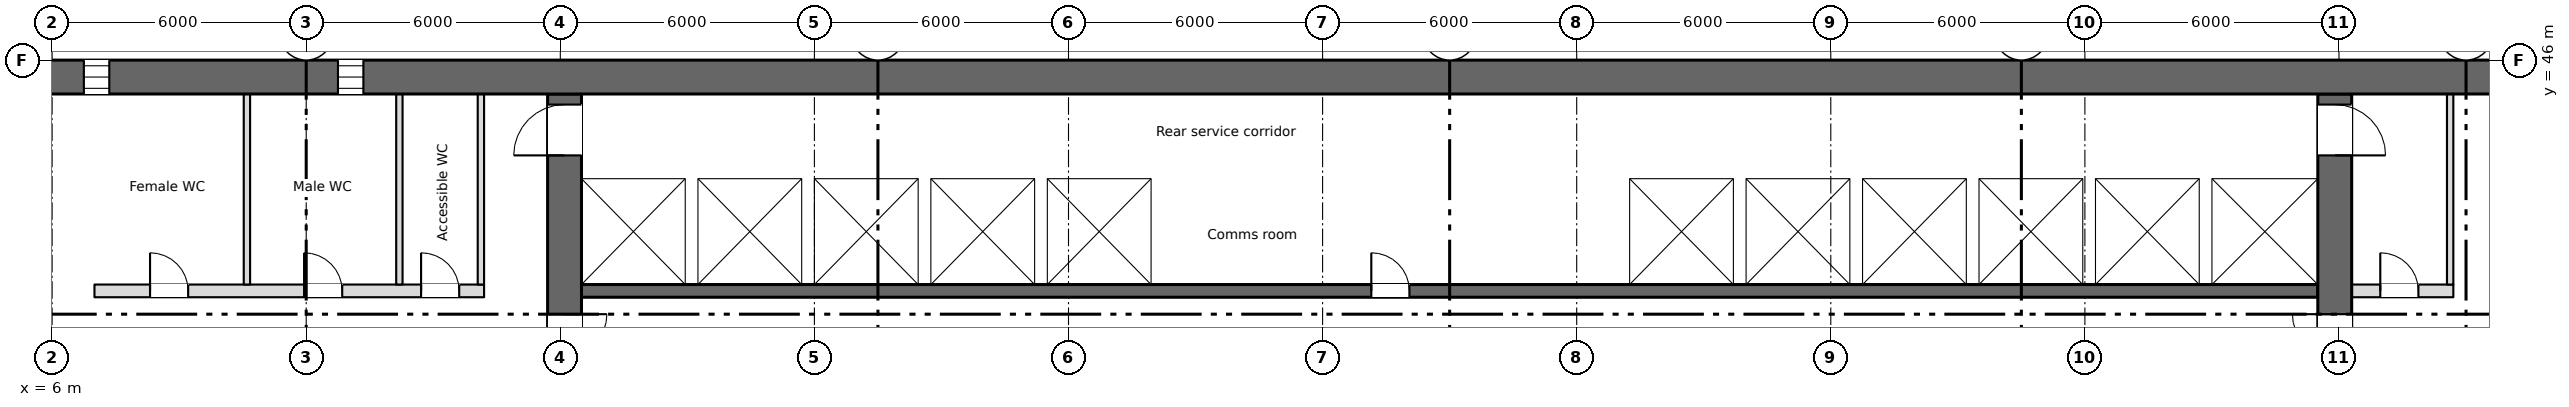
"""IFC4 building model, lengths in metres.
Left out: names, types, materials, properties, quantities, classifications, styles, units other than length and angle.
Written with IfcOpenShell. Run it as: python <this file> out.ifc"""

import sys

from ifc_helpers import new_model, si_unit, direction, frame, frame_2d, origin, place, context, subcontext, project, spatial, rectangle, extrude, element, fill, save


model = new_model("IFC4")
c1 = context("Model", 3, precision=1e-05, world=origin(), true_north=direction((0.0, 1.0)))
c2 = subcontext(c1, "Body", "Model", "MODEL_VIEW")
j1 = project(units=[si_unit("LENGTHUNIT", "METRE"), si_unit("PLANEANGLEUNIT", "RADIAN")], contexts=[c1])
p1 = place(None, origin())
s1 = spatial("IfcSite", under=j1, at=p1, CompositionType="ELEMENT")
p2 = place(p1, origin())
s2 = spatial("IfcBuilding", under=s1, at=p2, CompositionType="ELEMENT")
p3 = place(p2, frame((0.0, 0.0, 102.5)))
s3 = spatial("IfcBuildingStorey", under=s2, at=p3, CompositionType="ELEMENT", Elevation=102.5)
p4 = place(p3, frame((5.55, 45.6, 0.0), z_axis=(0.0, 0.0, 1.0), x_axis=(1.0, 0.0, 0.0)))
e1 = element("IfcWall", 1, at=p4, inside=s3, PredefinedType="SHEAR", context=c2, shape_type="SweptSolid", body=[
    extrude(rectangle(XDim=60.9, YDim=0.8, at=frame_2d((30.45, 0.0))), origin(), (0.0, 0.0, 1.0), 3.35),
])
p5 = place(p4, frame((1.2, 0.0, 0.6)))
e2 = element("IfcOpeningElement", 2, at=p5, cuts=e1, PredefinedType="OPENING", context=c2, shape_type="SweptSolid", body=[
    extrude(rectangle(XDim=0.6, YDim=2.4, at=frame_2d((0.3, 1.2))), frame((0.0, 0.41, 0.0), z_axis=(0.0, -1.0, 0.0), x_axis=(1.0, 0.0, 0.0)), (0.0, 0.0, 1.0), 0.82),
])
p6 = place(p4, frame((7.2, 0.0, 0.6)))
e3 = element("IfcOpeningElement", 3, at=p6, cuts=e1, PredefinedType="OPENING", context=c2, shape_type="SweptSolid", body=[
    extrude(rectangle(XDim=0.6, YDim=2.4, at=frame_2d((0.3, 1.2))), frame((0.0, 0.41, 0.0), z_axis=(0.0, -1.0, 0.0), x_axis=(1.0, 0.0, 0.0)), (0.0, 0.0, 1.0), 0.82),
])
p7 = place(p3, frame((6.85, 28.4, 0.0), z_axis=(0.0, 0.0, 1.0), x_axis=(0.0, 1.0, 0.0)))
e4 = element("IfcWall", 4, at=p7, inside=s3, PredefinedType="SHEAR", context=c2, shape_type="SweptSolid", body=[
    extrude(rectangle(XDim=16.8, YDim=0.3, at=frame_2d((8.4, 0.0))), origin(), (0.0, 0.0, 1.0), 3.35),
])
p8 = place(p3, frame((18.1, 28.4, 0.0), z_axis=(0.0, 0.0, 1.0), x_axis=(0.0, 1.0, 0.0)))
e5 = element("IfcWall", 5, at=p8, inside=s3, PredefinedType="SHEAR", context=c2, shape_type="SweptSolid", body=[
    extrude(rectangle(XDim=16.8, YDim=0.8, at=frame_2d((8.4, 0.0))), origin(), (0.0, 0.0, 1.0), 3.35),
])
p9 = place(p8, frame((9.6, 0.0, 0.0)))
e6 = element("IfcOpeningElement", 6, at=p9, cuts=e5, PredefinedType="OPENING", context=c2, shape_type="SweptSolid", body=[
    extrude(rectangle(XDim=2.0, YDim=2.1, at=frame_2d((1.0, 1.05))), frame((0.0, 0.41, 0.0), z_axis=(0.0, -1.0, 0.0), x_axis=(1.0, 0.0, 0.0)), (0.0, 0.0, 1.0), 0.82),
])
p10 = place(p8, frame((15.35, 0.0, 0.0)))
e7 = element("IfcOpeningElement", 7, at=p10, cuts=e5, PredefinedType="OPENING", context=c2, shape_type="SweptSolid", body=[
    extrude(rectangle(XDim=1.2, YDim=2.1, at=frame_2d((0.6, 1.05))), frame((0.0, 0.41, 0.0), z_axis=(0.0, -1.0, 0.0), x_axis=(1.0, 0.0, 0.0)), (0.0, 0.0, 1.0), 0.82),
])
p11 = place(p3, frame((59.9, 28.4, 0.0), z_axis=(0.0, 0.0, 1.0), x_axis=(0.0, 1.0, 0.0)))
e8 = element("IfcWall", 8, at=p11, inside=s3, PredefinedType="SHEAR", context=c2, shape_type="SweptSolid", body=[
    extrude(rectangle(XDim=16.8, YDim=0.8, at=frame_2d((8.4, 0.0))), origin(), (0.0, 0.0, 1.0), 3.35),
])
p12 = place(p11, frame((9.6, 0.0, 0.0)))
e9 = element("IfcOpeningElement", 9, at=p12, cuts=e8, PredefinedType="OPENING", context=c2, shape_type="SweptSolid", body=[
    extrude(rectangle(XDim=2.0, YDim=2.1, at=frame_2d((1.0, 1.05))), frame((0.0, 0.41, 0.0), z_axis=(0.0, -1.0, 0.0), x_axis=(1.0, 0.0, 0.0)), (0.0, 0.0, 1.0), 0.82),
])
p13 = place(p11, frame((15.35, 0.0, 0.0)))
e10 = element("IfcOpeningElement", 10, at=p13, cuts=e8, PredefinedType="OPENING", context=c2, shape_type="SweptSolid", body=[
    extrude(rectangle(XDim=1.2, YDim=2.1, at=frame_2d((0.6, 1.05))), frame((0.0, 0.41, 0.0), z_axis=(0.0, -1.0, 0.0), x_axis=(1.0, 0.0, 0.0)), (0.0, 0.0, 1.0), 0.82),
])
p14 = place(p3, frame((18.5, 40.55, 0.0), z_axis=(0.0, 0.0, 1.0), x_axis=(1.0, 0.0, 0.0)))
e11 = element("IfcWall", 11, at=p14, inside=s3, PredefinedType="SHEAR", context=c2, shape_type="SweptSolid", body=[
    extrude(rectangle(XDim=41.0, YDim=0.3, at=frame_2d((20.5, 0.0))), origin(), (0.0, 0.0, 1.0), 3.35),
])
p15 = place(p14, frame((18.65, 0.0, 0.0)))
e12 = element("IfcOpeningElement", 12, at=p15, cuts=e11, PredefinedType="OPENING", context=c2, shape_type="SweptSolid", body=[
    extrude(rectangle(XDim=0.9, YDim=2.1, at=frame_2d((0.45, 1.05))), frame((0.0, 0.16, 0.0), z_axis=(0.0, -1.0, 0.0), x_axis=(1.0, 0.0, 0.0)), (0.0, 0.0, 1.0), 0.32),
])
p16 = place(p14, frame((6.175, 0.0, 0.0)))
e13 = element("IfcOpeningElement", 13, at=p16, cuts=e11, PredefinedType="OPENING", context=c2, shape_type="SweptSolid", body=[
    extrude(rectangle(XDim=1.1, YDim=2.1, at=frame_2d((0.55, 1.05))), frame((0.0, 0.16, 0.0), z_axis=(0.0, -1.0, 0.0), x_axis=(1.0, 0.0, 0.0)), (0.0, 0.0, 1.0), 0.32),
])
p17 = place(p14, frame((8.925, 0.0, 0.0)))
e14 = element("IfcOpeningElement", 14, at=p17, cuts=e11, PredefinedType="OPENING", context=c2, shape_type="SweptSolid", body=[
    extrude(rectangle(XDim=1.1, YDim=2.1, at=frame_2d((0.55, 1.05))), frame((0.0, 0.16, 0.0), z_axis=(0.0, -1.0, 0.0), x_axis=(1.0, 0.0, 0.0)), (0.0, 0.0, 1.0), 0.32),
])
p18 = place(p14, frame((11.675, 0.0, 0.0)))
e15 = element("IfcOpeningElement", 15, at=p18, cuts=e11, PredefinedType="OPENING", context=c2, shape_type="SweptSolid", body=[
    extrude(rectangle(XDim=1.1, YDim=2.1, at=frame_2d((0.55, 1.05))), frame((0.0, 0.16, 0.0), z_axis=(0.0, -1.0, 0.0), x_axis=(1.0, 0.0, 0.0)), (0.0, 0.0, 1.0), 0.32),
])
p19 = place(p14, frame((30.925, 0.0, 0.0)))
e16 = element("IfcOpeningElement", 16, at=p19, cuts=e11, PredefinedType="OPENING", context=c2, shape_type="SweptSolid", body=[
    extrude(rectangle(XDim=1.1, YDim=2.1, at=frame_2d((0.55, 1.05))), frame((0.0, 0.16, 0.0), z_axis=(0.0, -1.0, 0.0), x_axis=(1.0, 0.0, 0.0)), (0.0, 0.0, 1.0), 0.32),
])
p20 = place(p14, frame((33.675, 0.0, 0.0)))
e17 = element("IfcOpeningElement", 17, at=p20, cuts=e11, PredefinedType="OPENING", context=c2, shape_type="SweptSolid", body=[
    extrude(rectangle(XDim=1.1, YDim=2.1, at=frame_2d((0.55, 1.05))), frame((0.0, 0.16, 0.0), z_axis=(0.0, -1.0, 0.0), x_axis=(1.0, 0.0, 0.0)), (0.0, 0.0, 1.0), 0.32),
])
p21 = place(p14, frame((36.375, 0.0, 0.0)))
e18 = element("IfcOpeningElement", 18, at=p21, cuts=e11, PredefinedType="OPENING", context=c2, shape_type="SweptSolid", body=[
    extrude(rectangle(XDim=1.2, YDim=2.1, at=frame_2d((0.6, 1.05))), frame((0.0, 0.16, 0.0), z_axis=(0.0, -1.0, 0.0), x_axis=(1.0, 0.0, 0.0)), (0.0, 0.0, 1.0), 0.32),
])
p22 = place(p14, frame((39.15, 0.0, 0.0)))
e19 = element("IfcOpeningElement", 19, at=p22, cuts=e11, PredefinedType="OPENING", context=c2, shape_type="SweptSolid", body=[
    extrude(rectangle(XDim=1.2, YDim=2.1, at=frame_2d((0.6, 1.05))), frame((0.0, 0.16, 0.0), z_axis=(0.0, -1.0, 0.0), x_axis=(1.0, 0.0, 0.0)), (0.0, 0.0, 1.0), 0.32),
])
p23 = place(p3, frame((18.5, 43.35, 0.0), z_axis=(0.0, 0.0, 1.0), x_axis=(1.0, 0.0, 0.0)))
e20 = element("IfcWall", 20, at=p23, inside=s3, PredefinedType="SHEAR", context=c2, shape_type="SweptSolid", body=[
    extrude(rectangle(XDim=41.0, YDim=0.3, at=frame_2d((20.5, 0.0))), origin(), (0.0, 0.0, 1.0), 3.35),
])
p24 = place(p3, frame((7.0, 40.55, 0.0), z_axis=(0.0, 0.0, 1.0), x_axis=(1.0, 0.0, 0.0)))
e21 = element("IfcWall", 21, at=p24, inside=s3, PredefinedType="PARTITIONING", context=c2, shape_type="SweptSolid", body=[
    extrude(rectangle(XDim=9.2, YDim=0.3, at=frame_2d((4.6, 0.0))), origin(), (0.0, 0.0, 1.0), 3.35),
])
p25 = place(p24, frame((1.312, 0.0, 0.0)))
e22 = element("IfcOpeningElement", 22, at=p25, cuts=e21, PredefinedType="OPENING", context=c2, shape_type="SweptSolid", body=[
    extrude(rectangle(XDim=0.9, YDim=2.1, at=frame_2d((0.45, 1.05))), frame((0.0, 0.16, 0.0), z_axis=(0.0, -1.0, 0.0), x_axis=(1.0, 0.0, 0.0)), (0.0, 0.0, 1.0), 0.32),
])
p26 = place(p24, frame((4.95, 0.0, 0.0)))
e23 = element("IfcOpeningElement", 23, at=p26, cuts=e21, PredefinedType="OPENING", context=c2, shape_type="SweptSolid", body=[
    extrude(rectangle(XDim=0.9, YDim=2.1, at=frame_2d((0.45, 1.05))), frame((0.0, 0.16, 0.0), z_axis=(0.0, -1.0, 0.0), x_axis=(1.0, 0.0, 0.0)), (0.0, 0.0, 1.0), 0.32),
])
p27 = place(p24, frame((7.712, 0.0, 0.0)))
e24 = element("IfcOpeningElement", 24, at=p27, cuts=e21, PredefinedType="OPENING", context=c2, shape_type="SweptSolid", body=[
    extrude(rectangle(XDim=0.9, YDim=2.1, at=frame_2d((0.45, 1.05))), frame((0.0, 0.16, 0.0), z_axis=(0.0, -1.0, 0.0), x_axis=(1.0, 0.0, 0.0)), (0.0, 0.0, 1.0), 0.32),
])
p28 = place(p3, frame((60.3, 40.55, 0.0), z_axis=(0.0, 0.0, 1.0), x_axis=(1.0, 0.0, 0.0)))
e25 = element("IfcWall", 25, at=p28, inside=s3, PredefinedType="PARTITIONING", context=c2, shape_type="SweptSolid", body=[
    extrude(rectangle(XDim=2.4, YDim=0.3, at=frame_2d((1.2, 0.0))), origin(), (0.0, 0.0, 1.0), 3.35),
])
p29 = place(p28, frame((0.675, 0.0, 0.0)))
e26 = element("IfcOpeningElement", 26, at=p29, cuts=e25, PredefinedType="OPENING", context=c2, shape_type="SweptSolid", body=[
    extrude(rectangle(XDim=0.9, YDim=2.1, at=frame_2d((0.45, 1.05))), frame((0.0, 0.16, 0.0), z_axis=(0.0, -1.0, 0.0), x_axis=(1.0, 0.0, 0.0)), (0.0, 0.0, 1.0), 0.32),
])
for number, where, z_axis, x_axis in (
    (27, (21.1, 40.7, 0.0), (0.0, 0.0, 1.0), (0.0, 1.0, 0.0)),
    (28, (23.85, 40.7, 0.0), (0.0, 0.0, 1.0), (0.0, 1.0, 0.0)),
    (29, (26.6, 40.7, 0.0), (0.0, 0.0, 1.0), (0.0, 1.0, 0.0)),
    (30, (29.35, 40.7, 0.0), (0.0, 0.0, 1.0), (0.0, 1.0, 0.0)),
    (31, (32.1, 40.7, 0.0), (0.0, 0.0, 1.0), (0.0, 1.0, 0.0)),
    (32, (43.1, 40.7, 0.0), (0.0, 0.0, 1.0), (0.0, 1.0, 0.0)),
    (33, (45.85, 40.7, 0.0), (0.0, 0.0, 1.0), (0.0, 1.0, 0.0)),
    (34, (48.6, 40.7, 0.0), (0.0, 0.0, 1.0), (0.0, 1.0, 0.0)),
    (35, (51.35, 40.7, 0.0), (0.0, 0.0, 1.0), (0.0, 1.0, 0.0)),
    (36, (54.1, 40.7, 0.0), (0.0, 0.0, 1.0), (0.0, 1.0, 0.0)),
    (37, (56.85, 40.7, 0.0), (0.0, 0.0, 1.0), (0.0, 1.0, 0.0)),
):
    element("IfcWall", number, at=place(p3, frame(where, z_axis=z_axis, x_axis=x_axis)), inside=s3, PredefinedType="SHEAR", context=c2, shape_type="SweptSolid", body=[
        extrude(rectangle(XDim=2.5, YDim=0.3, at=frame_2d((1.25, 0.0))), origin(), (0.0, 0.0, 1.0), 3.35),
    ])
for number, where, z_axis, x_axis in (
    (38, (16.125, 40.7, 0.0), (0.0, 0.0, 1.0), (0.0, 1.0, 0.0)),
    (39, (62.625, 40.7, 0.0), (0.0, 0.0, 1.0), (0.0, 1.0, 0.0)),
    (40, (10.6, 40.7, 0.0), (0.0, 0.0, 1.0), (0.0, 1.0, 0.0)),
    (41, (14.2, 40.7, 0.0), (0.0, 0.0, 1.0), (0.0, 1.0, 0.0)),
):
    element("IfcWall", number, at=place(p3, frame(where, z_axis=z_axis, x_axis=x_axis)), inside=s3, PredefinedType="PARTITIONING", context=c2, shape_type="SweptSolid", body=[
        extrude(rectangle(XDim=4.5, YDim=0.15, at=frame_2d((2.25, 0.0))), origin(), (0.0, 0.0, 1.0), 3.35),
    ])
p30 = place(p5, origin())
e42 = element("IfcWindow", 42, at=p30, inside=s3, PartitioningType="SINGLE_PANEL", PredefinedType="WINDOW", context=c2, shape_type="SweptSolid", body=[
    extrude(rectangle(XDim=0.6, YDim=2.4, at=frame_2d((0.3, 1.2))), frame((0.0, 0.03, 0.0), z_axis=(0.0, -1.0, 0.0), x_axis=(1.0, 0.0, 0.0)), (0.0, 0.0, 1.0), 0.06),
])
fill(e2, e42)
p31 = place(p6, origin())
e43 = element("IfcWindow", 43, at=p31, inside=s3, PartitioningType="SINGLE_PANEL", PredefinedType="WINDOW", context=c2, shape_type="SweptSolid", body=[
    extrude(rectangle(XDim=0.6, YDim=2.4, at=frame_2d((0.3, 1.2))), frame((0.0, 0.03, 0.0), z_axis=(0.0, -1.0, 0.0), x_axis=(1.0, 0.0, 0.0)), (0.0, 0.0, 1.0), 0.06),
])
fill(e3, e43)
p32 = place(p25, origin())
e44 = element("IfcDoor", 44, at=p32, inside=s3, OperationType="SINGLE_SWING_LEFT", PredefinedType="DOOR", context=c2, shape_type="SweptSolid", body=[
    extrude(rectangle(XDim=0.9, YDim=2.1, at=frame_2d((0.45, 1.05))), frame((0.0, 0.025, 0.0), z_axis=(0.0, -1.0, 0.0), x_axis=(1.0, 0.0, 0.0)), (0.0, 0.0, 1.0), 0.05),
])
fill(e22, e44)
p33 = place(p26, origin())
e45 = element("IfcDoor", 45, at=p33, inside=s3, OperationType="SINGLE_SWING_LEFT", PredefinedType="DOOR", context=c2, shape_type="SweptSolid", body=[
    extrude(rectangle(XDim=0.9, YDim=2.1, at=frame_2d((0.45, 1.05))), frame((0.0, 0.025, 0.0), z_axis=(0.0, -1.0, 0.0), x_axis=(1.0, 0.0, 0.0)), (0.0, 0.0, 1.0), 0.05),
])
fill(e23, e45)
p34 = place(p27, origin())
e46 = element("IfcDoor", 46, at=p34, inside=s3, OperationType="SINGLE_SWING_LEFT", PredefinedType="DOOR", context=c2, shape_type="SweptSolid", body=[
    extrude(rectangle(XDim=0.9, YDim=2.1, at=frame_2d((0.45, 1.05))), frame((0.0, 0.025, 0.0), z_axis=(0.0, -1.0, 0.0), x_axis=(1.0, 0.0, 0.0)), (0.0, 0.0, 1.0), 0.05),
])
fill(e24, e46)
p35 = place(p29, origin())
e47 = element("IfcDoor", 47, at=p35, inside=s3, OperationType="SINGLE_SWING_LEFT", PredefinedType="DOOR", context=c2, shape_type="SweptSolid", body=[
    extrude(rectangle(XDim=0.9, YDim=2.1, at=frame_2d((0.45, 1.05))), frame((0.0, 0.025, 0.0), z_axis=(0.0, -1.0, 0.0), x_axis=(1.0, 0.0, 0.0)), (0.0, 0.0, 1.0), 0.05),
])
fill(e26, e47)
p36 = place(p15, origin())
e48 = element("IfcDoor", 48, at=p36, inside=s3, OperationType="SINGLE_SWING_LEFT", PredefinedType="DOOR", context=c2, shape_type="SweptSolid", body=[
    extrude(rectangle(XDim=0.9, YDim=2.1, at=frame_2d((0.45, 1.05))), frame((0.0, 0.025, 0.0), z_axis=(0.0, -1.0, 0.0), x_axis=(1.0, 0.0, 0.0)), (0.0, 0.0, 1.0), 0.05),
])
fill(e12, e48)
p37 = place(p16, origin())
e49 = element("IfcDoor", 49, at=p37, inside=s3, OperationType="SLIDING_TO_LEFT", PredefinedType="DOOR", context=c2, shape_type="SweptSolid", body=[
    extrude(rectangle(XDim=1.1, YDim=2.1, at=frame_2d((0.55, 1.05))), frame((0.0, 0.025, 0.0), z_axis=(0.0, -1.0, 0.0), x_axis=(1.0, 0.0, 0.0)), (0.0, 0.0, 1.0), 0.05),
])
fill(e13, e49)
p38 = place(p17, origin())
e50 = element("IfcDoor", 50, at=p38, inside=s3, OperationType="SLIDING_TO_LEFT", PredefinedType="DOOR", context=c2, shape_type="SweptSolid", body=[
    extrude(rectangle(XDim=1.1, YDim=2.1, at=frame_2d((0.55, 1.05))), frame((0.0, 0.025, 0.0), z_axis=(0.0, -1.0, 0.0), x_axis=(1.0, 0.0, 0.0)), (0.0, 0.0, 1.0), 0.05),
])
fill(e14, e50)
p39 = place(p18, origin())
e51 = element("IfcDoor", 51, at=p39, inside=s3, OperationType="SLIDING_TO_LEFT", PredefinedType="DOOR", context=c2, shape_type="SweptSolid", body=[
    extrude(rectangle(XDim=1.1, YDim=2.1, at=frame_2d((0.55, 1.05))), frame((0.0, 0.025, 0.0), z_axis=(0.0, -1.0, 0.0), x_axis=(1.0, 0.0, 0.0)), (0.0, 0.0, 1.0), 0.05),
])
fill(e15, e51)
p40 = place(p19, origin())
e52 = element("IfcDoor", 52, at=p40, inside=s3, OperationType="SLIDING_TO_LEFT", PredefinedType="DOOR", context=c2, shape_type="SweptSolid", body=[
    extrude(rectangle(XDim=1.1, YDim=2.1, at=frame_2d((0.55, 1.05))), frame((0.0, 0.025, 0.0), z_axis=(0.0, -1.0, 0.0), x_axis=(1.0, 0.0, 0.0)), (0.0, 0.0, 1.0), 0.05),
])
fill(e16, e52)
p41 = place(p20, origin())
e53 = element("IfcDoor", 53, at=p41, inside=s3, OperationType="SLIDING_TO_LEFT", PredefinedType="DOOR", context=c2, shape_type="SweptSolid", body=[
    extrude(rectangle(XDim=1.1, YDim=2.1, at=frame_2d((0.55, 1.05))), frame((0.0, 0.025, 0.0), z_axis=(0.0, -1.0, 0.0), x_axis=(1.0, 0.0, 0.0)), (0.0, 0.0, 1.0), 0.05),
])
fill(e17, e53)
p42 = place(p21, origin())
e54 = element("IfcDoor", 54, at=p42, inside=s3, OperationType="SLIDING_TO_LEFT", PredefinedType="DOOR", context=c2, shape_type="SweptSolid", body=[
    extrude(rectangle(XDim=1.2, YDim=2.1, at=frame_2d((0.6, 1.05))), frame((0.0, 0.025, 0.0), z_axis=(0.0, -1.0, 0.0), x_axis=(1.0, 0.0, 0.0)), (0.0, 0.0, 1.0), 0.05),
])
fill(e18, e54)
p43 = place(p22, origin())
e55 = element("IfcDoor", 55, at=p43, inside=s3, OperationType="SLIDING_TO_LEFT", PredefinedType="DOOR", context=c2, shape_type="SweptSolid", body=[
    extrude(rectangle(XDim=1.2, YDim=2.1, at=frame_2d((0.6, 1.05))), frame((0.0, 0.025, 0.0), z_axis=(0.0, -1.0, 0.0), x_axis=(1.0, 0.0, 0.0)), (0.0, 0.0, 1.0), 0.05),
])
fill(e19, e55)
p44 = place(p9, origin())
e56 = element("IfcDoor", 56, at=p44, inside=s3, OperationType="DOUBLE_DOOR_SINGLE_SWING", PredefinedType="DOOR", context=c2, shape_type="SweptSolid", body=[
    extrude(rectangle(XDim=2.0, YDim=2.1, at=frame_2d((1.0, 1.05))), frame((0.0, 0.025, 0.0), z_axis=(0.0, -1.0, 0.0), x_axis=(1.0, 0.0, 0.0)), (0.0, 0.0, 1.0), 0.05),
])
fill(e6, e56)
p45 = place(p12, origin())
e57 = element("IfcDoor", 57, at=p45, inside=s3, OperationType="DOUBLE_DOOR_SINGLE_SWING", PredefinedType="DOOR", context=c2, shape_type="SweptSolid", body=[
    extrude(rectangle(XDim=2.0, YDim=2.1, at=frame_2d((1.0, 1.05))), frame((0.0, 0.025, 0.0), z_axis=(0.0, -1.0, 0.0), x_axis=(1.0, 0.0, 0.0)), (0.0, 0.0, 1.0), 0.05),
])
fill(e9, e57)
p46 = place(p10, origin())
e58 = element("IfcDoor", 58, at=p46, inside=s3, OperationType="SINGLE_SWING_LEFT", PredefinedType="DOOR", context=c2, shape_type="SweptSolid", body=[
    extrude(rectangle(XDim=1.2, YDim=2.1, at=frame_2d((0.6, 1.05))), frame((0.0, 0.025, 0.0), z_axis=(0.0, -1.0, 0.0), x_axis=(1.0, 0.0, 0.0)), (0.0, 0.0, 1.0), 0.05),
])
fill(e7, e58)
p47 = place(p13, origin())
e59 = element("IfcDoor", 59, at=p47, inside=s3, OperationType="SINGLE_SWING_LEFT", PredefinedType="DOOR", context=c2, shape_type="SweptSolid", body=[
    extrude(rectangle(XDim=1.2, YDim=2.1, at=frame_2d((0.6, 1.05))), frame((0.0, 0.025, 0.0), z_axis=(0.0, -1.0, 0.0), x_axis=(1.0, 0.0, 0.0)), (0.0, 0.0, 1.0), 0.05),
])
fill(e10, e59)
save(model, sys.argv[1])
